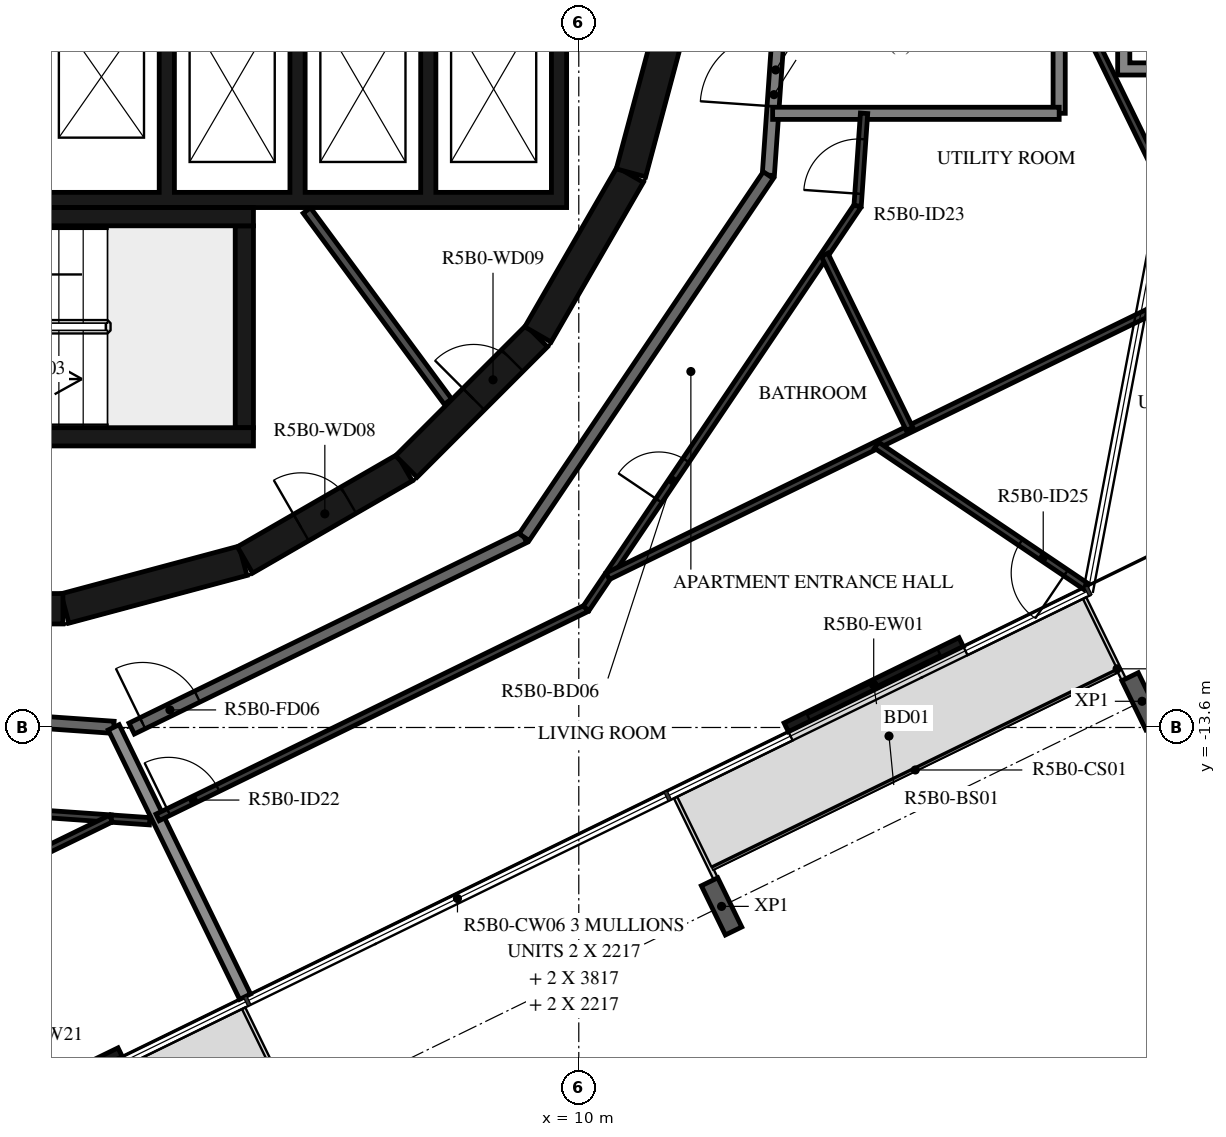
"""IFC4 building model, lengths in metres.
Left out: names, types, materials, properties, quantities, classifications, styles, units other than length and angle.
Written with IfcOpenShell. Run it as: python <this file> out.ifc"""

import sys

from ifc_helpers import new_model, si_unit, direction, frame, frame_2d, origin, origin_2d, place, context, subcontext, project, spatial, polyline, rectangle, i_section, outline, extrude, element, fill, save


model = new_model("IFC4")
c1 = context("Model", 3, precision=1e-05, world=origin(), true_north=direction((0.0, 1.0)))
c2 = subcontext(c1, "Body", "Model", "MODEL_VIEW")
j1 = project(units=[si_unit("LENGTHUNIT", "METRE"), si_unit("PLANEANGLEUNIT", "RADIAN")], contexts=[c1])
p1 = place(None, origin())
s1 = spatial("IfcSite", under=j1, at=p1, CompositionType="ELEMENT")
p2 = place(p1, origin())
s2 = spatial("IfcBuilding", under=s1, at=p2, CompositionType="ELEMENT")
p3 = place(p2, frame((0.0, 0.0, 202.4)))
s3 = spatial("IfcBuildingStorey", under=s2, at=p3, CompositionType="ELEMENT", Elevation=202.4)
for number, where, z_axis, x_axis in (
    (1, (12.348, -16.542, -0.38), (0.0, 0.0, 1.0), (-0.899, -0.438, 0.0)),
    (2, (19.263, -13.169, -0.38), (0.0, 0.0, 1.0), (-0.899, -0.438, 0.0)),
):
    element("IfcColumn", number, at=place(p3, frame(where, z_axis=z_axis, x_axis=x_axis)), inside=s3, PredefinedType="COLUMN", context=c2, shape_type="SweptSolid", body=[
        extrude(i_section(OverallWidth=0.3, OverallDepth=0.9, WebThickness=0.019, FlangeThickness=0.035, FilletRadius=0.03, at=origin_2d()), origin(), (0.0, 0.0, 1.0), 3.5),
    ])
p4 = place(p3, frame((-0.418, -20.343, 0.0), z_axis=(0.0, 0.0, 1.0), x_axis=(0.898778711213, 0.43840258698, 0.0)))
e3 = element("IfcWall", 3, at=p4, inside=s3, PredefinedType="STANDARD", context=c2, shape_type="SweptSolid", body=[
    extrude(rectangle(XDim=3.2, YDim=0.16, at=frame_2d((1.6, 0.0))), origin(), (0.0, 0.0, 1.0), 3.12),
])
p5 = place(p4, frame((0.4, 0.0, 0.0)))
e4 = element("IfcOpeningElement", 4, at=p5, cuts=e3, PredefinedType="OPENING", context=c2, shape_type="SweptSolid", body=[
    extrude(rectangle(XDim=2.4, YDim=2.4, at=frame_2d((1.2, 1.2))), frame((0.0, 0.09, 0.0), z_axis=(0.0, -1.0, 0.0), x_axis=(1.0, 0.0, 0.0)), (0.0, 0.0, 1.0), 0.18),
])
p6 = place(p3, frame((13.412, -13.598, 0.0), z_axis=(0.0, 0.0, 1.0), x_axis=(0.898793373747, 0.438372525723, 0.0)))
e5 = element("IfcWall", 5, at=p6, inside=s3, PredefinedType="STANDARD", context=c2, shape_type="SweptSolid", body=[
    extrude(rectangle(XDim=3.2, YDim=0.16, at=frame_2d((1.6, 0.0))), origin(), (0.0, 0.0, 1.0), 3.12),
])
p7 = place(p6, frame((0.4, 0.0, 0.0)))
e6 = element("IfcOpeningElement", 6, at=p7, cuts=e5, PredefinedType="OPENING", context=c2, shape_type="SweptSolid", body=[
    extrude(rectangle(XDim=2.4, YDim=2.4, at=frame_2d((1.2, 1.2))), frame((0.0, 0.09, 0.0), z_axis=(0.0, -1.0, 0.0), x_axis=(1.0, 0.0, 0.0)), (0.0, 0.0, 1.0), 0.18),
])
p8 = place(p3, frame((1.55, -11.643, 0.0), z_axis=(0.0, 0.0, 1.0), x_axis=(0.965948410781, 0.258734743916, 0.0)))
e7 = element("IfcWall", 7, at=p8, inside=s3, PredefinedType="SHEAR", context=c2, shape_type="SweptSolid", body=[
    extrude(rectangle(XDim=3.033, YDim=0.5, at=frame_2d((1.516, 0.0))), origin(), (0.0, 0.0, 1.0), 3.12),
])
p9 = place(p3, frame((4.51, -10.845, 0.0), z_axis=(0.0, 0.0, 1.0), x_axis=(0.865975092491, 0.500087131594, 0.0)))
e8 = element("IfcWall", 8, at=p9, inside=s3, PredefinedType="SHEAR", context=c2, shape_type="SweptSolid", body=[
    extrude(rectangle(XDim=3.033, YDim=0.5, at=frame_2d((1.516, 0.0))), origin(), (0.0, 0.0, 1.0), 3.12),
])
p10 = place(p9, frame((1.066, 0.0, 0.0)))
e9 = element("IfcOpeningElement", 9, at=p10, cuts=e8, PredefinedType="OPENING", context=c2, shape_type="SweptSolid", body=[
    extrude(rectangle(XDim=0.9, YDim=2.1, at=frame_2d((0.45, 1.05))), frame((0.0, 0.26, 0.0), z_axis=(0.0, -1.0, 0.0), x_axis=(1.0, 0.0, 0.0)), (0.0, 0.0, 1.0), 0.52),
])
p11 = place(p3, frame((7.164, -9.308, 0.0), z_axis=(0.0, 0.0, 1.0), x_axis=(0.707106781187, 0.707106781187, 0.0)))
e10 = element("IfcWall", 10, at=p11, inside=s3, PredefinedType="SHEAR", context=c2, shape_type="SweptSolid", body=[
    extrude(rectangle(XDim=3.032, YDim=0.5, at=frame_2d((1.516, 0.0))), origin(), (0.0, 0.0, 1.0), 3.12),
])
p12 = place(p11, frame((1.566, 0.0, 0.0)))
e11 = element("IfcOpeningElement", 11, at=p12, cuts=e10, PredefinedType="OPENING", context=c2, shape_type="SweptSolid", body=[
    extrude(rectangle(XDim=0.9, YDim=2.1, at=frame_2d((0.45, 1.05))), frame((0.0, 0.26, 0.0), z_axis=(0.0, -1.0, 0.0), x_axis=(1.0, 0.0, 0.0)), (0.0, 0.0, 1.0), 0.52),
])
for number, where, z_axis, x_axis in (
    (12, (9.329, -7.137, 0.0), (0.0, 0.0, 1.0), (0.5, 0.866, 0.0)),
    (13, (10.858, -4.479, 0.0), (0.0, 0.0, 1.0), (0.259, 0.966, 0.0)),
):
    element("IfcWall", number, at=place(p3, frame(where, z_axis=z_axis, x_axis=x_axis)), inside=s3, PredefinedType="SHEAR", context=c2, shape_type="SweptSolid", body=[
        extrude(rectangle(XDim=3.033, YDim=0.5, at=frame_2d((1.516, 0.0))), origin(), (0.0, 0.0, 1.0), 3.12),
    ])
p13 = place(p3, frame((-1.516, -11.647, 0.0), z_axis=(0.0, 0.0, 1.0), x_axis=(1.0, 0.0, 0.0)))
e14 = element("IfcWall", 14, at=p13, inside=s3, PredefinedType="SHEAR", context=c2, shape_type="SweptSolid", body=[
    extrude(rectangle(XDim=3.033, YDim=0.5, at=frame_2d((1.516, 0.0))), origin(), (0.0, 0.0, 1.0), 3.12),
])
p14 = place(p13, frame((0.016, 0.0, 0.0)))
e15 = element("IfcOpeningElement", 15, at=p14, cuts=e14, PredefinedType="OPENING", context=c2, shape_type="SweptSolid", body=[
    extrude(rectangle(XDim=1.2, YDim=2.1, at=frame_2d((0.6, 1.05))), frame((0.0, 0.26, 0.0), z_axis=(0.0, -1.0, 0.0), x_axis=(1.0, 0.0, 0.0)), (0.0, 0.0, 1.0), 0.52),
])
p15 = place(p3, frame((-2.4, -5.2, 0.0), z_axis=(0.0, 0.0, 1.0), x_axis=(1.0, 0.0, 0.0)))
e16 = element("IfcWall", 16, at=p15, inside=s3, PredefinedType="SHEAR", context=c2, shape_type="SweptSolid", body=[
    extrude(rectangle(XDim=7.05, YDim=0.3, at=frame_2d((3.525, 0.0))), origin(), (0.0, 0.0, 1.0), 3.12),
])
p16 = place(p3, frame((4.5, -8.67, 0.0), z_axis=(0.0, 0.0, 1.0), x_axis=(0.0, 1.0, 0.0)))
e17 = element("IfcWall", 17, at=p16, inside=s3, PredefinedType="SHEAR", context=c2, shape_type="SweptSolid", body=[
    extrude(rectangle(XDim=3.32, YDim=0.3, at=frame_2d((1.66, 0.0))), origin(), (0.0, 0.0, 1.0), 3.12),
])
p17 = place(p3, frame((0.1, -8.82, 0.0), z_axis=(0.0, 0.0, 1.0), x_axis=(1.0, 0.0, 0.0)))
e18 = element("IfcWall", 18, at=p17, inside=s3, PredefinedType="SHEAR", context=c2, shape_type="SweptSolid", body=[
    extrude(rectangle(XDim=4.55, YDim=0.3, at=frame_2d((2.275, 0.0))), origin(), (0.0, 0.0, 1.0), 3.12),
])
p18 = place(p3, origin())
e19 = element("IfcWall", 19, at=p18, inside=s3, PredefinedType="SHEAR", context=c2, shape_type="SweptSolid", body=[
    extrude(outline(polyline([(9.8, -5.05), (9.8, -4.8), (9.8, -1.9), (9.55, -1.9), (9.55, -4.8), (7.65, -4.8), (7.65, -1.9), (7.4, -1.9), (7.4, -4.8), (5.5, -4.8), (5.5, -1.9), (5.25, -1.9), (5.25, -4.8), (3.35, -4.8), (3.35, -1.9), (3.1, -1.9), (3.1, -4.8), (1.2, -4.8), (1.2, -1.9), (0.95, -1.9), (0.95, -4.8), (-0.95, -4.8), (-0.95, -1.9), (-1.2, -1.9), (-1.2, -4.8), (-3.1, -4.8), (-3.1, -1.9), (-3.35, -1.9), (-3.35, -4.8), (-5.25, -4.8), (-5.25, -1.9), (-5.5, -1.9), (-5.5, -4.8), (-7.4, -4.8), (-7.4, -1.9), (-7.65, -1.9), (-7.65, -4.8), (-9.55, -4.8), (-9.55, -1.9), (-9.8, -1.9), (-9.8, -4.8), (-9.8, -5.05), (9.8, -5.05)])), origin(), (0.0, 0.0, 1.0), 3.12),
])
p19 = place(p3, frame((5.528, -5.098, 0.0), z_axis=(0.0, 0.0, 1.0), x_axis=(0.594034318069, -0.804439698769, 0.0)))
e20 = element("IfcWall", 20, at=p19, inside=s3, PredefinedType="PARTITIONING", context=c2, shape_type="SweptSolid", body=[
    extrude(rectangle(XDim=3.907, YDim=0.15, at=frame_2d((1.953, 0.0))), origin(), (0.0, 0.0, 1.0), 3.12),
])
p20 = place(p3, frame((13.117, -4.517, 0.0), z_axis=(0.0, 0.0, 1.0), x_axis=(0.069736659613, 0.997565435601, 0.0)))
e21 = element("IfcWall", 21, at=p20, inside=s3, PredefinedType="STANDARD", context=c2, shape_type="SweptSolid", body=[
    extrude(rectangle(XDim=2.654, YDim=0.2, at=frame_2d((1.327, 0.0))), origin(), (0.0, 0.0, 1.0), 3.12),
])
p21 = place(p20, frame((1.134, 0.0, 0.0)))
e22 = element("IfcOpeningElement", 22, at=p21, cuts=e21, PredefinedType="OPENING", context=c2, shape_type="SweptSolid", body=[
    extrude(rectangle(XDim=1.2, YDim=2.1, at=frame_2d((0.6, 1.05))), frame((0.0, 0.11, 0.0), z_axis=(0.0, -1.0, 0.0), x_axis=(1.0, 0.0, 0.0)), (0.0, 0.0, 1.0), 0.22),
])
p22 = place(p3, frame((-4.517, -13.117, 0.0), z_axis=(0.0, 0.0, 1.0), x_axis=(0.997564669554, -0.069747616856, 0.0)))
e23 = element("IfcWall", 23, at=p22, inside=s3, PredefinedType="STANDARD", context=c2, shape_type="SweptSolid", body=[
    extrude(rectangle(XDim=6.885, YDim=0.2, at=frame_2d((3.443, 0.0))), origin(), (0.0, 0.0, 1.0), 3.12),
])
p23 = place(p22, frame((3.2, 0.0, 0.0)))
e24 = element("IfcOpeningElement", 24, at=p23, cuts=e23, PredefinedType="OPENING", context=c2, shape_type="SweptSolid", body=[
    extrude(rectangle(XDim=1.0, YDim=2.1, at=frame_2d((0.5, 1.05))), frame((0.0, 0.11, 0.0), z_axis=(0.0, -1.0, 0.0), x_axis=(1.0, 0.0, 0.0)), (0.0, 0.0, 1.0), 0.22),
])
p24 = place(p3, frame((2.647, -13.618, 0.0), z_axis=(0.0, 0.0, 1.0), x_axis=(0.898796543751, 0.438366026218, 0.0)))
e25 = element("IfcWall", 25, at=p24, inside=s3, PredefinedType="STANDARD", context=c2, shape_type="SweptSolid", body=[
    extrude(rectangle(XDim=7.181, YDim=0.2, at=frame_2d((3.591, 0.0))), origin(), (0.0, 0.0, 1.0), 3.12),
])
p25 = place(p24, frame((0.2, 0.0, 0.0)))
e26 = element("IfcOpeningElement", 26, at=p25, cuts=e25, PredefinedType="OPENING", context=c2, shape_type="SweptSolid", body=[
    extrude(rectangle(XDim=1.0, YDim=2.1, at=frame_2d((0.5, 1.05))), frame((0.0, 0.11, 0.0), z_axis=(0.0, -1.0, 0.0), x_axis=(1.0, 0.0, 0.0)), (0.0, 0.0, 1.0), 0.22),
])
p26 = place(p3, frame((9.101, -10.47, 0.0), z_axis=(0.0, 0.0, 1.0), x_axis=(0.559195469534, 0.829035841718, 0.0)))
e27 = element("IfcWall", 27, at=p26, inside=s3, PredefinedType="STANDARD", context=c2, shape_type="SweptSolid", body=[
    extrude(rectangle(XDim=7.181, YDim=0.2, at=frame_2d((3.591, 0.0))), origin(), (0.0, 0.0, 1.0), 3.12),
])
p27 = place(p3, frame((17.9, -3.5, 0.0), z_axis=(0.0, 0.0, 1.0), x_axis=(0.0, 1.0, 0.0)))
e28 = element("IfcWall", 28, at=p27, inside=s3, PredefinedType="STANDARD", context=c2, shape_type="SweptSolid", body=[
    extrude(rectangle(XDim=7.0, YDim=0.2, at=frame_2d((3.5, 0.0))), origin(), (0.0, 0.0, 1.0), 3.12),
])
p28 = place(p3, frame((13.188, -3.5, 0.0), z_axis=(0.0, 0.0, 1.0), x_axis=(1.0, 0.0, 0.0)))
e29 = element("IfcWall", 29, at=p28, inside=s3, PredefinedType="STANDARD", context=c2, shape_type="SweptSolid", body=[
    extrude(rectangle(XDim=4.712, YDim=0.2, at=frame_2d((2.356, 0.0))), origin(), (0.0, 0.0, 1.0), 3.12),
])
p29 = place(p3, frame((4.512, -18.027, 0.0), z_axis=(0.0, 0.0, 1.0), x_axis=(-0.438374835386, 0.898792247241, 0.0)))
e30 = element("IfcWall", 30, at=p29, inside=s3, PredefinedType="STANDARD", context=c2, shape_type="SweptSolid", body=[
    extrude(rectangle(XDim=4.929, YDim=0.2, at=frame_2d((2.464, 0.0))), origin(), (0.0, 0.0, 1.0), 2.73),
])
p30 = place(p3, frame((-5.022, -14.585, 0.0), z_axis=(0.0, 0.0, 1.0), x_axis=(0.997564196041, -0.06975438895, 0.0)))
e31 = element("IfcWall", 31, at=p30, inside=s3, PredefinedType="PARTITIONING", context=c2, shape_type="SweptSolid", body=[
    extrude(rectangle(XDim=7.346, YDim=0.12, at=frame_2d((3.673, 0.0))), origin(), (0.0, 0.0, 1.0), 3.12),
])
p31 = place(p30, frame((1.37, 0.0, 0.0)))
e32 = element("IfcOpeningElement", 32, at=p31, cuts=e31, PredefinedType="OPENING", context=c2, shape_type="SweptSolid", body=[
    extrude(rectangle(XDim=0.8, YDim=2.1, at=frame_2d((0.4, 1.05))), frame((0.0, 0.07, 0.0), z_axis=(0.0, -1.0, 0.0), x_axis=(1.0, 0.0, 0.0)), (0.0, 0.0, 1.0), 0.14),
])
p32 = place(p3, frame((2.306, -15.098, 0.0), z_axis=(0.0, 0.0, 1.0), x_axis=(0.99757571817, -0.069589413839, 0.0)))
e33 = element("IfcWall", 33, at=p32, inside=s3, PredefinedType="PARTITIONING", context=c2, shape_type="SweptSolid", body=[
    extrude(rectangle(XDim=0.638, YDim=0.12, at=frame_2d((0.319, 0.0))), origin(), (0.0, 0.0, 1.0), 3.12),
])
p33 = place(p3, frame((-9.269, -20.743, 0.0), z_axis=(0.0, 0.0, 1.0), x_axis=(0.898796865831, 0.438365365846, 0.0)))
e34 = element("IfcWall", 34, at=p33, inside=s3, PredefinedType="PARTITIONING", context=c2, shape_type="SweptSolid", body=[
    extrude(rectangle(XDim=12.879, YDim=0.12, at=frame_2d((6.439, 0.0))), origin(), (0.0, 0.0, 1.0), 3.12),
])
p34 = place(p33, frame((2.395, 0.0, 0.0)))
e35 = element("IfcOpeningElement", 35, at=p34, cuts=e34, PredefinedType="OPENING", context=c2, shape_type="SweptSolid", body=[
    extrude(rectangle(XDim=0.9, YDim=2.1, at=frame_2d((0.45, 1.05))), frame((0.0, 0.07, 0.0), z_axis=(0.0, -1.0, 0.0), x_axis=(1.0, 0.0, 0.0)), (0.0, 0.0, 1.0), 0.14),
])
p35 = place(p3, frame((3.074, -15.078, 0.0), z_axis=(0.0, 0.0, 1.0), x_axis=(0.898793586225, 0.43837209008, 0.0)))
e36 = element("IfcWall", 36, at=p35, inside=s3, PredefinedType="PARTITIONING", context=c2, shape_type="SweptSolid", body=[
    extrude(rectangle(XDim=7.839, YDim=0.12, at=frame_2d((3.92, 0.0))), origin(), (0.0, 0.0, 1.0), 3.12),
])
p36 = place(p35, frame((0.2, 0.0, 0.0)))
e37 = element("IfcOpeningElement", 37, at=p36, cuts=e36, PredefinedType="OPENING", context=c2, shape_type="SweptSolid", body=[
    extrude(rectangle(XDim=0.9, YDim=2.1, at=frame_2d((0.45, 1.05))), frame((0.0, 0.07, 0.0), z_axis=(0.0, -1.0, 0.0), x_axis=(1.0, 0.0, 0.0)), (0.0, 0.0, 1.0), 0.14),
])
p37 = place(p3, frame((10.12, -11.642, 0.0), z_axis=(0.0, 0.0, 1.0), x_axis=(0.55920080659, 0.829032241779, 0.0)))
e38 = element("IfcWall", 38, at=p37, inside=s3, PredefinedType="PARTITIONING", context=c2, shape_type="SweptSolid", body=[
    extrude(rectangle(XDim=7.985, YDim=0.12, at=frame_2d((3.992, 0.0))), origin(), (0.0, 0.0, 1.0), 3.12),
])
p38 = place(p37, frame((2.138, 0.0, 0.0)))
e39 = element("IfcOpeningElement", 39, at=p38, cuts=e38, PredefinedType="OPENING", context=c2, shape_type="SweptSolid", body=[
    extrude(rectangle(XDim=0.8, YDim=2.1, at=frame_2d((0.4, 1.05))), frame((0.0, 0.07, 0.0), z_axis=(0.0, -1.0, 0.0), x_axis=(1.0, 0.0, 0.0)), (0.0, 0.0, 1.0), 0.14),
])
p39 = place(p3, frame((14.585, -5.022, 0.0), z_axis=(0.0, 0.0, 1.0), x_axis=(0.069757481187, 0.997563979812, 0.0)))
e40 = element("IfcWall", 40, at=p39, inside=s3, PredefinedType="PARTITIONING", context=c2, shape_type="SweptSolid", body=[
    extrude(rectangle(XDim=1.526, YDim=0.12, at=frame_2d((0.763, 0.0))), origin(), (0.0, 0.0, 1.0), 3.12),
])
p40 = place(p39, frame((0.2, 0.0, 0.0)))
e41 = element("IfcOpeningElement", 41, at=p40, cuts=e40, PredefinedType="OPENING", context=c2, shape_type="SweptSolid", body=[
    extrude(rectangle(XDim=0.9, YDim=2.1, at=frame_2d((0.45, 1.05))), frame((0.0, 0.07, 0.0), z_axis=(0.0, -1.0, 0.0), x_axis=(1.0, 0.0, 0.0)), (0.0, 0.0, 1.0), 0.14),
])
p41 = place(p3, frame((22.052, -5.467, 0.0), z_axis=(0.0, 0.0, 1.0), x_axis=(-0.898796865831, -0.438365365846, 0.0)))
e42 = element("IfcWall", 42, at=p41, inside=s3, PredefinedType="PARTITIONING", context=c2, shape_type="SweptSolid", body=[
    extrude(rectangle(XDim=12.879, YDim=0.12, at=frame_2d((6.439, 0.0))), origin(), (0.0, 0.0, 1.0), 3.12),
])
p42 = place(p3, frame((18.343, -11.282, 0.0), z_axis=(0.0, 0.0, 1.0), x_axis=(-0.829047434778, 0.559178281845, 0.0)))
e43 = element("IfcWall", 43, at=p42, inside=s3, PredefinedType="PARTITIONING", context=c2, shape_type="SweptSolid", body=[
    extrude(rectangle(XDim=4.157, YDim=0.12, at=frame_2d((2.079, 0.0))), origin(), (0.0, 0.0, 1.0), 3.12),
])
p43 = place(p42, frame((0.4, 0.0, 0.0)))
e44 = element("IfcOpeningElement", 44, at=p43, cuts=e43, PredefinedType="OPENING", context=c2, shape_type="SweptSolid", body=[
    extrude(rectangle(XDim=0.9, YDim=2.1, at=frame_2d((0.45, 1.05))), frame((0.0, 0.07, 0.0), z_axis=(0.0, -1.0, 0.0), x_axis=(1.0, 0.0, 0.0)), (0.0, 0.0, 1.0), 0.14),
])
p44 = place(p3, frame((15.44, -8.692, 0.0), z_axis=(0.0, 0.0, 1.0), x_axis=(-0.438339139088, 0.898809656792, 0.0)))
e45 = element("IfcWall", 45, at=p44, inside=s3, PredefinedType="PARTITIONING", context=c2, shape_type="SweptSolid", body=[
    extrude(rectangle(XDim=3.188, YDim=0.12, at=frame_2d((1.594, 0.0))), origin(), (0.0, 0.0, 1.0), 3.12),
])
p45 = place(p3, frame((20.403, -6.271, 0.0), z_axis=(0.0, 0.0, 1.0), x_axis=(-0.438371913736, 0.898793672234, 0.0)))
e46 = element("IfcWall", 46, at=p45, inside=s3, PredefinedType="PARTITIONING", context=c2, shape_type="SweptSolid", body=[
    extrude(rectangle(XDim=5.58, YDim=0.12, at=frame_2d((2.79, 0.0))), origin(), (0.0, 0.0, 1.0), 3.12),
])
p46 = place(p45, frame((0.2, 0.0, 0.0)))
e47 = element("IfcOpeningElement", 47, at=p46, cuts=e46, PredefinedType="OPENING", context=c2, shape_type="SweptSolid", body=[
    extrude(rectangle(XDim=0.9, YDim=2.1, at=frame_2d((0.45, 1.05))), frame((0.0, 0.07, 0.0), z_axis=(0.0, -1.0, 0.0), x_axis=(1.0, 0.0, 0.0)), (0.0, 0.0, 1.0), 0.14),
])
p47 = place(p3, origin())
e48 = element("IfcWall", 48, at=p47, inside=s3, PredefinedType="STANDARD", context=c2, shape_type="SweptSolid", body=[
    extrude(outline(polyline([(21.762, 0.03), (21.762, -2.87), (18.862, -2.87), (18.862, 0.03), (21.762, 0.03)]), holes=[polyline([(19.062, -2.67), (21.562, -2.67), (21.562, -0.17), (19.062, -0.17), (19.062, -2.67)])]), origin(), (0.0, 0.0, 1.0), 3.12),
])
p48 = place(p7, origin())
e49 = element("IfcDoor", 49, at=p48, inside=s3, OperationType="DOUBLE_DOOR_SLIDING", PredefinedType="DOOR", context=c2, shape_type="SweptSolid", body=[
    extrude(rectangle(XDim=2.4, YDim=2.4, at=frame_2d((1.2, 1.2))), frame((0.0, 0.025, 0.0), z_axis=(0.0, -1.0, 0.0), x_axis=(1.0, 0.0, 0.0)), (0.0, 0.0, 1.0), 0.05),
])
fill(e6, e49)
p49 = place(p10, origin())
e50 = element("IfcDoor", 50, at=p49, inside=s3, OperationType="SINGLE_SWING_RIGHT", PredefinedType="DOOR", context=c2, shape_type="SweptSolid", body=[
    extrude(rectangle(XDim=0.9, YDim=2.1, at=frame_2d((0.45, 1.05))), frame((0.0, 0.025, 0.0), z_axis=(0.0, -1.0, 0.0), x_axis=(1.0, 0.0, 0.0)), (0.0, 0.0, 1.0), 0.05),
])
fill(e9, e50)
p50 = place(p12, origin())
e51 = element("IfcDoor", 51, at=p50, inside=s3, OperationType="SINGLE_SWING_LEFT", PredefinedType="DOOR", context=c2, shape_type="SweptSolid", body=[
    extrude(rectangle(XDim=0.9, YDim=2.1, at=frame_2d((0.45, 1.05))), frame((0.0, 0.025, 0.0), z_axis=(0.0, -1.0, 0.0), x_axis=(1.0, 0.0, 0.0)), (0.0, 0.0, 1.0), 0.05),
])
fill(e11, e51)
p51 = place(p25, origin())
e52 = element("IfcDoor", 52, at=p51, inside=s3, OperationType="SINGLE_SWING_LEFT", PredefinedType="DOOR", context=c2, shape_type="SweptSolid", body=[
    extrude(rectangle(XDim=1.0, YDim=2.1, at=frame_2d((0.5, 1.05))), frame((0.0, 0.025, 0.0), z_axis=(0.0, -1.0, 0.0), x_axis=(1.0, 0.0, 0.0)), (0.0, 0.0, 1.0), 0.05),
])
fill(e26, e52)
p52 = place(p36, origin())
e53 = element("IfcDoor", 53, at=p52, inside=s3, OperationType="SINGLE_SWING_LEFT", PredefinedType="DOOR", context=c2, shape_type="SweptSolid", body=[
    extrude(rectangle(XDim=0.9, YDim=2.1, at=frame_2d((0.45, 1.05))), frame((0.0, 0.025, 0.0), z_axis=(0.0, -1.0, 0.0), x_axis=(1.0, 0.0, 0.0)), (0.0, 0.0, 1.0), 0.05),
])
fill(e37, e53)
p53 = place(p38, origin())
e54 = element("IfcDoor", 54, at=p53, inside=s3, OperationType="SINGLE_SWING_RIGHT", PredefinedType="DOOR", context=c2, shape_type="SweptSolid", body=[
    extrude(rectangle(XDim=0.8, YDim=2.1, at=frame_2d((0.4, 1.05))), frame((0.0, 0.025, 0.0), z_axis=(0.0, -1.0, 0.0), x_axis=(1.0, 0.0, 0.0)), (0.0, 0.0, 1.0), 0.05),
])
fill(e39, e54)
p54 = place(p40, origin())
e55 = element("IfcDoor", 55, at=p54, inside=s3, OperationType="SINGLE_SWING_RIGHT", PredefinedType="DOOR", context=c2, shape_type="SweptSolid", body=[
    extrude(rectangle(XDim=0.9, YDim=2.1, at=frame_2d((0.45, 1.05))), frame((0.0, 0.025, 0.0), z_axis=(0.0, -1.0, 0.0), x_axis=(1.0, 0.0, 0.0)), (0.0, 0.0, 1.0), 0.05),
])
fill(e41, e55)
p55 = place(p43, origin())
e56 = element("IfcDoor", 56, at=p55, inside=s3, OperationType="SINGLE_SWING_RIGHT", PredefinedType="DOOR", context=c2, shape_type="SweptSolid", body=[
    extrude(rectangle(XDim=0.9, YDim=2.1, at=frame_2d((0.45, 1.05))), frame((0.0, 0.025, 0.0), z_axis=(0.0, -1.0, 0.0), x_axis=(1.0, 0.0, 0.0)), (0.0, 0.0, 1.0), 0.05),
])
fill(e44, e56)
p56 = place(p21, origin())
e57 = element("IfcDoor", 57, at=p56, inside=s3, OperationType="DOUBLE_DOOR_SINGLE_SWING", PredefinedType="DOOR", context=c2, shape_type="SweptSolid", body=[
    extrude(rectangle(XDim=1.2, YDim=2.1, at=frame_2d((0.6, 1.05))), frame((0.0, 0.025, 0.0), z_axis=(0.0, -1.0, 0.0), x_axis=(1.0, 0.0, 0.0)), (0.0, 0.0, 1.0), 0.05),
])
fill(e22, e57)
save(model, sys.argv[1])
